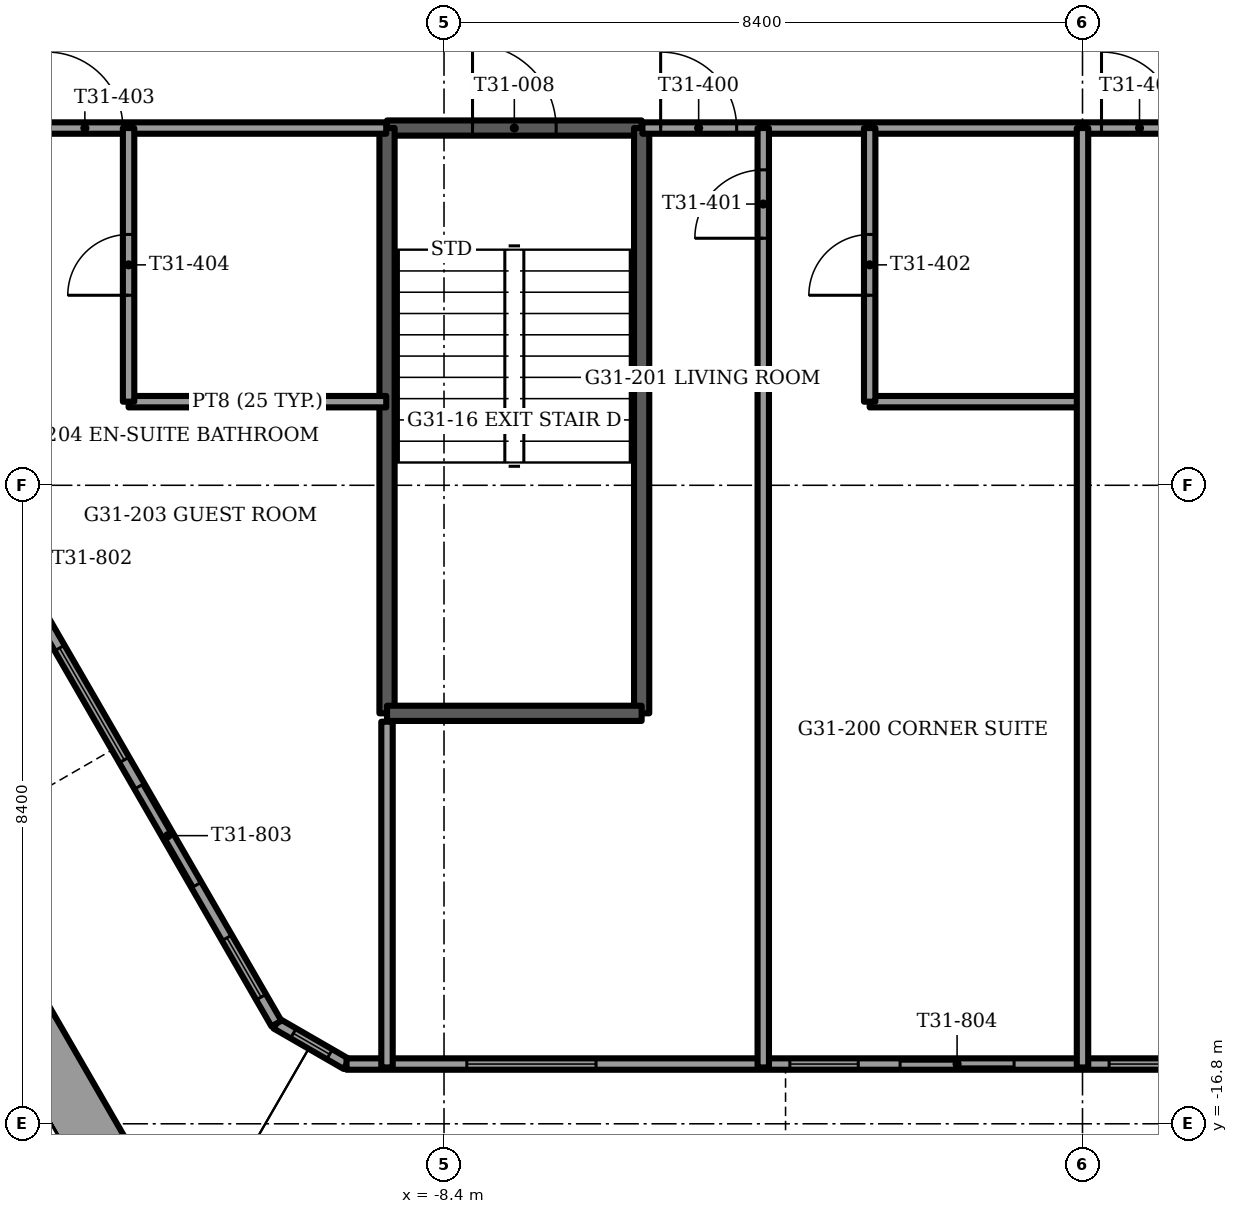
"""IFC4 building model, lengths in metres.
Left out: names, types, materials, properties, quantities, classifications, styles, units other than length and angle.
Written with IfcOpenShell. Run it as: python <this file> out.ifc"""

import sys

from ifc_helpers import new_model, si_unit, direction, frame, frame_2d, origin, place, context, subcontext, project, spatial, rectangle, extrude, element, fill, save


model = new_model("IFC4")
c1 = context("Model", 3, precision=1e-05, world=origin(), true_north=direction((0.0, 1.0)))
c2 = subcontext(c1, "Body", "Model", "MODEL_VIEW")
j1 = project(units=[si_unit("LENGTHUNIT", "METRE"), si_unit("PLANEANGLEUNIT", "RADIAN")], contexts=[c1])
p1 = place(None, origin())
s1 = spatial("IfcSite", under=j1, at=p1, CompositionType="ELEMENT")
p2 = place(p1, origin())
s2 = spatial("IfcBuilding", under=s1, at=p2, CompositionType="ELEMENT")
p3 = place(p2, frame((0.0, 0.0, 127.25)))
s3 = spatial("IfcBuildingStorey", under=s2, at=p3, CompositionType="ELEMENT", Elevation=127.25)
p4 = place(p3, frame((-14.952, -13.802, 0.0), z_axis=(0.0, 0.0, 1.0), x_axis=(0.499982573574, -0.866035464703, 0.0)))
e1 = element("IfcWall", 1, at=p4, inside=s3, PredefinedType="PARAPET", context=c2, shape_type="SweptSolid", body=[
    extrude(rectangle(XDim=5.281, YDim=0.9, at=frame_2d((2.641, 0.0))), origin(), (0.0, 0.0, 1.0), 1.1),
])
p5 = place(p3, frame((-18.71, -1.444, 0.0), z_axis=(0.0, 0.0, 1.0), x_axis=(0.500010582961, -0.866019293623, 0.0)))
e2 = element("IfcWall", 2, at=p5, inside=s3, PredefinedType="SOLIDWALL", context=c2, shape_type="SweptSolid", body=[
    extrude(rectangle(XDim=16.21, YDim=0.15, at=frame_2d((8.105, 0.0))), origin(), (0.0, 0.0, 1.0), 3.45),
])
p6 = place(p5, frame((2.93, 0.0, 0.15)))
e3 = element("IfcOpeningElement", 3, at=p6, cuts=e2, PredefinedType="OPENING", context=c2, shape_type="SweptSolid", body=[
    extrude(rectangle(XDim=0.9, YDim=2.85, at=frame_2d((0.45, 1.425))), frame((0.0, 0.075, 0.0), z_axis=(0.0, -1.0, 0.0), x_axis=(1.0, 0.0, 0.0)), (0.0, 0.0, 1.0), 0.15),
])
p7 = place(p5, frame((4.205, 0.0, 0.0)))
e4 = element("IfcOpeningElement", 4, at=p7, cuts=e2, PredefinedType="OPENING", context=c2, shape_type="SweptSolid", body=[
    extrude(rectangle(XDim=1.5, YDim=2.4, at=frame_2d((0.75, 1.2))), frame((0.0, 0.075, 0.0), z_axis=(0.0, -1.0, 0.0), x_axis=(1.0, 0.0, 0.0)), (0.0, 0.0, 1.0), 0.15),
])
p8 = place(p5, frame((6.305, 0.0, 0.15)))
e5 = element("IfcOpeningElement", 5, at=p8, cuts=e2, PredefinedType="OPENING", context=c2, shape_type="SweptSolid", body=[
    extrude(rectangle(XDim=1.7, YDim=2.85, at=frame_2d((0.85, 1.425))), frame((0.0, 0.075, 0.0), z_axis=(0.0, -1.0, 0.0), x_axis=(1.0, 0.0, 0.0)), (0.0, 0.0, 1.0), 0.15),
])
p9 = place(p5, frame((8.405, 0.0, 0.0)))
e6 = element("IfcOpeningElement", 6, at=p9, cuts=e2, PredefinedType="OPENING", context=c2, shape_type="SweptSolid", body=[
    extrude(rectangle(XDim=1.5, YDim=2.4, at=frame_2d((0.75, 1.2))), frame((0.0, 0.075, 0.0), z_axis=(0.0, -1.0, 0.0), x_axis=(1.0, 0.0, 0.0)), (0.0, 0.0, 1.0), 0.15),
])
p10 = place(p5, frame((10.505, 0.0, 0.15)))
e7 = element("IfcOpeningElement", 7, at=p10, cuts=e2, PredefinedType="OPENING", context=c2, shape_type="SweptSolid", body=[
    extrude(rectangle(XDim=1.7, YDim=2.85, at=frame_2d((0.85, 1.425))), frame((0.0, 0.075, 0.0), z_axis=(0.0, -1.0, 0.0), x_axis=(1.0, 0.0, 0.0)), (0.0, 0.0, 1.0), 0.15),
])
p11 = place(p5, frame((12.605, 0.0, 0.0)))
e8 = element("IfcOpeningElement", 8, at=p11, cuts=e2, PredefinedType="OPENING", context=c2, shape_type="SweptSolid", body=[
    extrude(rectangle(XDim=1.5, YDim=2.4, at=frame_2d((0.75, 1.2))), frame((0.0, 0.075, 0.0), z_axis=(0.0, -1.0, 0.0), x_axis=(1.0, 0.0, 0.0)), (0.0, 0.0, 1.0), 0.15),
])
p12 = place(p5, frame((0.402, 0.0, 0.15)))
e9 = element("IfcOpeningElement", 9, at=p12, cuts=e2, PredefinedType="OPENING", context=c2, shape_type="SweptSolid", body=[
    extrude(rectangle(XDim=0.9, YDim=2.73, at=frame_2d((0.45, 1.365))), frame((0.0, 0.075, 0.0), z_axis=(0.0, -1.0, 0.0), x_axis=(1.0, 0.0, 0.0)), (0.0, 0.0, 1.0), 0.15),
])
p13 = place(p5, frame((14.907, 0.0, 0.15)))
e10 = element("IfcOpeningElement", 10, at=p13, cuts=e2, PredefinedType="OPENING", context=c2, shape_type="SweptSolid", body=[
    extrude(rectangle(XDim=0.9, YDim=2.73, at=frame_2d((0.45, 1.365))), frame((0.0, 0.075, 0.0), z_axis=(0.0, -1.0, 0.0), x_axis=(1.0, 0.0, 0.0)), (0.0, 0.0, 1.0), 0.15),
])
p14 = place(p3, frame((-9.683, -16.014, 0.0), z_axis=(0.0, 0.0, 1.0), x_axis=(1.0, 0.0, 0.0)))
e11 = element("IfcWall", 11, at=p14, inside=s3, PredefinedType="SOLIDWALL", context=c2, shape_type="SweptSolid", body=[
    extrude(rectangle(XDim=19.365, YDim=0.15, at=frame_2d((9.683, 0.0))), origin(), (0.0, 0.0, 1.0), 3.45),
])
p15 = place(p14, frame((1.583, 0.0, 0.15)))
e12 = element("IfcOpeningElement", 12, at=p15, cuts=e11, PredefinedType="OPENING", context=c2, shape_type="SweptSolid", body=[
    extrude(rectangle(XDim=1.7, YDim=2.85, at=frame_2d((0.85, 1.425))), frame((0.0, 0.075, 0.0), z_axis=(0.0, -1.0, 0.0), x_axis=(1.0, 0.0, 0.0)), (0.0, 0.0, 1.0), 0.15),
])
p16 = place(p14, frame((5.833, 0.0, 0.15)))
e13 = element("IfcOpeningElement", 13, at=p16, cuts=e11, PredefinedType="OPENING", context=c2, shape_type="SweptSolid", body=[
    extrude(rectangle(XDim=0.9, YDim=2.85, at=frame_2d((0.45, 1.425))), frame((0.0, 0.075, 0.0), z_axis=(0.0, -1.0, 0.0), x_axis=(1.0, 0.0, 0.0)), (0.0, 0.0, 1.0), 0.15),
])
p17 = place(p14, frame((7.283, 0.0, 0.0)))
e14 = element("IfcOpeningElement", 14, at=p17, cuts=e11, PredefinedType="OPENING", context=c2, shape_type="SweptSolid", body=[
    extrude(rectangle(XDim=1.5, YDim=2.4, at=frame_2d((0.75, 1.2))), frame((0.0, 0.075, 0.0), z_axis=(0.0, -1.0, 0.0), x_axis=(1.0, 0.0, 0.0)), (0.0, 0.0, 1.0), 0.15),
])
p18 = place(p14, frame((10.033, 0.0, 0.15)))
e15 = element("IfcOpeningElement", 15, at=p18, cuts=e11, PredefinedType="OPENING", context=c2, shape_type="SweptSolid", body=[
    extrude(rectangle(XDim=1.7, YDim=2.85, at=frame_2d((0.85, 1.425))), frame((0.0, 0.075, 0.0), z_axis=(0.0, -1.0, 0.0), x_axis=(1.0, 0.0, 0.0)), (0.0, 0.0, 1.0), 0.15),
])
p19 = place(p14, frame((12.083, 0.0, 0.0)))
e16 = element("IfcOpeningElement", 16, at=p19, cuts=e11, PredefinedType="OPENING", context=c2, shape_type="SweptSolid", body=[
    extrude(rectangle(XDim=1.5, YDim=2.4, at=frame_2d((0.75, 1.2))), frame((0.0, 0.075, 0.0), z_axis=(0.0, -1.0, 0.0), x_axis=(1.0, 0.0, 0.0)), (0.0, 0.0, 1.0), 0.15),
])
p20 = place(p14, frame((15.833, 0.0, 0.15)))
e17 = element("IfcOpeningElement", 17, at=p20, cuts=e11, PredefinedType="OPENING", context=c2, shape_type="SweptSolid", body=[
    extrude(rectangle(XDim=1.7, YDim=2.85, at=frame_2d((0.85, 1.425))), frame((0.0, 0.075, 0.0), z_axis=(0.0, -1.0, 0.0), x_axis=(1.0, 0.0, 0.0)), (0.0, 0.0, 1.0), 0.15),
])
p21 = place(p3, frame((-10.605, -15.481, 0.0), z_axis=(0.0, 0.0, 1.0), x_axis=(0.866048165231, -0.499960573946, 0.0)))
e18 = element("IfcWall", 18, at=p21, inside=s3, PredefinedType="SOLIDWALL", context=c2, shape_type="SweptSolid", body=[
    extrude(rectangle(XDim=1.065, YDim=0.15, at=frame_2d((0.532, 0.0))), origin(), (0.0, 0.0, 1.0), 3.45),
])
p22 = place(p21, frame((0.258, 0.0, 0.15)))
e19 = element("IfcOpeningElement", 19, at=p22, cuts=e18, PredefinedType="OPENING", context=c2, shape_type="SweptSolid", body=[
    extrude(rectangle(XDim=0.55, YDim=2.85, at=frame_2d((0.275, 1.425))), frame((0.0, 0.075, 0.0), z_axis=(0.0, -1.0, 0.0), x_axis=(1.0, 0.0, 0.0)), (0.0, 0.0, 1.0), 0.15),
])
p23 = place(p3, frame((-9.15, -3.7, -0.3), z_axis=(0.0, 0.0, 1.0), x_axis=(1.0, 0.0, 0.0)))
e20 = element("IfcWall", 20, at=p23, inside=s3, PredefinedType="SOLIDWALL", context=c2, shape_type="SweptSolid", body=[
    extrude(rectangle(XDim=3.35, YDim=0.2, at=frame_2d((1.675, 0.0))), origin(), (0.0, 0.0, 1.0), 3.75),
])
p24 = place(p23, frame((1.125, 0.0, 0.0)))
e21 = element("IfcOpeningElement", 21, at=p24, cuts=e20, PredefinedType="OPENING", context=c2, shape_type="SweptSolid", body=[
    extrude(rectangle(XDim=1.1, YDim=2.1, at=frame_2d((0.55, 1.05))), frame((0.0, 0.1, 0.0), z_axis=(0.0, -1.0, 0.0), x_axis=(1.0, 0.0, 0.0)), (0.0, 0.0, 1.0), 0.2),
])
for number, where, z_axis, x_axis in (
    (22, (-9.15, -3.7, -0.3), (0.0, 0.0, 1.0), (0.0, -1.0, 0.0)),
    (23, (-5.8, -3.7, -0.3), (0.0, 0.0, 1.0), (0.0, -1.0, 0.0)),
):
    element("IfcWall", number, at=place(p3, frame(where, z_axis=z_axis, x_axis=x_axis)), inside=s3, PredefinedType="SOLIDWALL", context=c2, shape_type="SweptSolid", body=[
        extrude(rectangle(XDim=7.7, YDim=0.2, at=frame_2d((3.85, 0.0))), origin(), (0.0, 0.0, 1.0), 3.75),
    ])
p25 = place(p3, frame((-9.15, -11.4, -0.3), z_axis=(0.0, 0.0, 1.0), x_axis=(1.0, 0.0, 0.0)))
e24 = element("IfcWall", 24, at=p25, inside=s3, PredefinedType="SOLIDWALL", context=c2, shape_type="SweptSolid", body=[
    extrude(rectangle(XDim=3.35, YDim=0.2, at=frame_2d((1.675, 0.0))), origin(), (0.0, 0.0, 1.0), 3.75),
])
p26 = place(p3, frame((-12.55, -7.3, 0.0), z_axis=(0.0, 0.0, 1.0), x_axis=(1.0, 0.0, 0.0)))
e25 = element("IfcWall", 25, at=p26, inside=s3, PredefinedType="PARTITIONING", context=c2, shape_type="SweptSolid", body=[
    extrude(rectangle(XDim=3.39, YDim=0.15, at=frame_2d((1.695, 0.0))), origin(), (0.0, 0.0, 1.0), 3.45),
])
p27 = place(p3, frame((-2.8, -7.3, 0.0), z_axis=(0.0, 0.0, 1.0), x_axis=(1.0, 0.0, 0.0)))
e26 = element("IfcWall", 26, at=p27, inside=s3, PredefinedType="PARTITIONING", context=c2, shape_type="SweptSolid", body=[
    extrude(rectangle(XDim=2.8, YDim=0.15, at=frame_2d((1.4, 0.0))), origin(), (0.0, 0.0, 1.0), 3.45),
])
p28 = place(p3, frame((-17.459, -3.7, 0.0), z_axis=(0.0, 0.0, 1.0), x_axis=(1.0, 0.0, 0.0)))
e27 = element("IfcWall", 27, at=p28, inside=s3, PredefinedType="PARTITIONING", context=c2, shape_type="SweptSolid", body=[
    extrude(rectangle(XDim=8.299, YDim=0.15, at=frame_2d((4.149, 0.0))), origin(), (0.0, 0.0, 1.0), 3.45),
])
p29 = place(p28, frame((3.834, 0.0, 0.0)))
e28 = element("IfcOpeningElement", 28, at=p29, cuts=e27, PredefinedType="OPENING", context=c2, shape_type="SweptSolid", body=[
    extrude(rectangle(XDim=1.0, YDim=2.1, at=frame_2d((0.5, 1.05))), frame((0.0, 0.075, 0.0), z_axis=(0.0, -1.0, 0.0), x_axis=(1.0, 0.0, 0.0)), (0.0, 0.0, 1.0), 0.15),
])
p30 = place(p3, frame((-5.79, -3.7, 0.0), z_axis=(0.0, 0.0, 1.0), x_axis=(1.0, 0.0, 0.0)))
e29 = element("IfcWall", 29, at=p30, inside=s3, PredefinedType="PARTITIONING", context=c2, shape_type="SweptSolid", body=[
    extrude(rectangle(XDim=11.58, YDim=0.15, at=frame_2d((5.79, 0.0))), origin(), (0.0, 0.0, 1.0), 3.45),
])
p31 = place(p30, frame((0.24, 0.0, 0.0)))
e30 = element("IfcOpeningElement", 30, at=p31, cuts=e29, PredefinedType="OPENING", context=c2, shape_type="SweptSolid", body=[
    extrude(rectangle(XDim=1.0, YDim=2.1, at=frame_2d((0.5, 1.05))), frame((0.0, 0.075, 0.0), z_axis=(0.0, -1.0, 0.0), x_axis=(1.0, 0.0, 0.0)), (0.0, 0.0, 1.0), 0.15),
])
p32 = place(p30, frame((6.04, 0.0, 0.0)))
e31 = element("IfcOpeningElement", 31, at=p32, cuts=e29, PredefinedType="OPENING", context=c2, shape_type="SweptSolid", body=[
    extrude(rectangle(XDim=1.0, YDim=2.1, at=frame_2d((0.5, 1.05))), frame((0.0, 0.075, 0.0), z_axis=(0.0, -1.0, 0.0), x_axis=(1.0, 0.0, 0.0)), (0.0, 0.0, 1.0), 0.15),
])
p33 = place(p3, frame((0.0, -16.059, 0.0), z_axis=(0.0, 0.0, 1.0), x_axis=(0.0, 1.0, 0.0)))
e32 = element("IfcWall", 32, at=p33, inside=s3, PredefinedType="PARTITIONING", context=c2, shape_type="SweptSolid", body=[
    extrude(rectangle(XDim=12.359, YDim=0.15, at=frame_2d((6.18, 0.0))), origin(), (0.0, 0.0, 1.0), 3.45),
])
p34 = place(p3, frame((-2.8, -7.3, 0.0), z_axis=(0.0, 0.0, 1.0), x_axis=(0.0, 1.0, 0.0)))
e33 = element("IfcWall", 33, at=p34, inside=s3, PredefinedType="PARTITIONING", context=c2, shape_type="SweptSolid", body=[
    extrude(rectangle(XDim=3.6, YDim=0.15, at=frame_2d((1.8, 0.0))), origin(), (0.0, 0.0, 1.0), 3.45),
])
p35 = place(p34, frame((1.4, 0.0, 0.0)))
e34 = element("IfcOpeningElement", 34, at=p35, cuts=e33, PredefinedType="OPENING", context=c2, shape_type="SweptSolid", body=[
    extrude(rectangle(XDim=0.8, YDim=2.1, at=frame_2d((0.4, 1.05))), frame((0.0, 0.075, 0.0), z_axis=(0.0, -1.0, 0.0), x_axis=(1.0, 0.0, 0.0)), (0.0, 0.0, 1.0), 0.15),
])
p36 = place(p3, frame((-4.2, -16.059, 0.0), z_axis=(0.0, 0.0, 1.0), x_axis=(0.0, 1.0, 0.0)))
e35 = element("IfcWall", 35, at=p36, inside=s3, PredefinedType="PARTITIONING", context=c2, shape_type="SweptSolid", body=[
    extrude(rectangle(XDim=12.359, YDim=0.15, at=frame_2d((6.18, 0.0))), origin(), (0.0, 0.0, 1.0), 3.45),
])
p37 = place(p36, frame((10.909, 0.0, 0.0)))
e36 = element("IfcOpeningElement", 36, at=p37, cuts=e35, PredefinedType="OPENING", context=c2, shape_type="SweptSolid", body=[
    extrude(rectangle(XDim=0.9, YDim=2.1, at=frame_2d((0.45, 1.05))), frame((0.0, 0.075, 0.0), z_axis=(0.0, -1.0, 0.0), x_axis=(1.0, 0.0, 0.0)), (0.0, 0.0, 1.0), 0.15),
])
p38 = place(p3, frame((-9.15, -16.059, 0.0), z_axis=(0.0, 0.0, 1.0), x_axis=(0.0, 1.0, 0.0)))
e37 = element("IfcWall", 37, at=p38, inside=s3, PredefinedType="PARTITIONING", context=c2, shape_type="SweptSolid", body=[
    extrude(rectangle(XDim=4.549, YDim=0.15, at=frame_2d((2.274, 0.0))), origin(), (0.0, 0.0, 1.0), 3.45),
])
p39 = place(p3, frame((-12.55, -7.3, 0.0), z_axis=(0.0, 0.0, 1.0), x_axis=(0.0, 1.0, 0.0)))
e38 = element("IfcWall", 38, at=p39, inside=s3, PredefinedType="PARTITIONING", context=c2, shape_type="SweptSolid", body=[
    extrude(rectangle(XDim=3.6, YDim=0.15, at=frame_2d((1.8, 0.0))), origin(), (0.0, 0.0, 1.0), 3.45),
])
p40 = place(p39, frame((1.4, 0.0, 0.0)))
e39 = element("IfcOpeningElement", 39, at=p40, cuts=e38, PredefinedType="OPENING", context=c2, shape_type="SweptSolid", body=[
    extrude(rectangle(XDim=0.8, YDim=2.1, at=frame_2d((0.4, 1.05))), frame((0.0, 0.075, 0.0), z_axis=(0.0, -1.0, 0.0), x_axis=(1.0, 0.0, 0.0)), (0.0, 0.0, 1.0), 0.15),
])
p41 = place(p10, origin())
e40 = element("IfcWindow", 40, at=p41, inside=s3, PartitioningType="SINGLE_PANEL", PredefinedType="WINDOW", context=c2, shape_type="SweptSolid", body=[
    extrude(rectangle(XDim=1.7, YDim=2.85, at=frame_2d((0.85, 1.425))), frame((0.0, 0.03, 0.0), z_axis=(0.0, -1.0, 0.0), x_axis=(1.0, 0.0, 0.0)), (0.0, 0.0, 1.0), 0.06),
])
fill(e7, e40)
p42 = place(p11, origin())
e41 = element("IfcDoor", 41, at=p42, inside=s3, OperationType="SLIDING_TO_LEFT", PredefinedType="DOOR", context=c2, shape_type="SweptSolid", body=[
    extrude(rectangle(XDim=1.5, YDim=2.4, at=frame_2d((0.75, 1.2))), frame((0.0, 0.025, 0.0), z_axis=(0.0, -1.0, 0.0), x_axis=(1.0, 0.0, 0.0)), (0.0, 0.0, 1.0), 0.05),
])
fill(e8, e41)
p43 = place(p13, origin())
e42 = element("IfcWindow", 42, at=p43, inside=s3, PartitioningType="SINGLE_PANEL", PredefinedType="WINDOW", context=c2, shape_type="SweptSolid", body=[
    extrude(rectangle(XDim=0.9, YDim=2.73, at=frame_2d((0.45, 1.365))), frame((0.0, 0.03, 0.0), z_axis=(0.0, -1.0, 0.0), x_axis=(1.0, 0.0, 0.0)), (0.0, 0.0, 1.0), 0.06),
])
fill(e10, e42)
p44 = place(p15, origin())
e43 = element("IfcWindow", 43, at=p44, inside=s3, PartitioningType="SINGLE_PANEL", PredefinedType="WINDOW", context=c2, shape_type="SweptSolid", body=[
    extrude(rectangle(XDim=1.7, YDim=2.85, at=frame_2d((0.85, 1.425))), frame((0.0, 0.03, 0.0), z_axis=(0.0, -1.0, 0.0), x_axis=(1.0, 0.0, 0.0)), (0.0, 0.0, 1.0), 0.06),
])
fill(e12, e43)
p45 = place(p16, origin())
e44 = element("IfcWindow", 44, at=p45, inside=s3, PartitioningType="SINGLE_PANEL", PredefinedType="WINDOW", context=c2, shape_type="SweptSolid", body=[
    extrude(rectangle(XDim=0.9, YDim=2.85, at=frame_2d((0.45, 1.425))), frame((0.0, 0.03, 0.0), z_axis=(0.0, -1.0, 0.0), x_axis=(1.0, 0.0, 0.0)), (0.0, 0.0, 1.0), 0.06),
])
fill(e13, e44)
p46 = place(p17, origin())
e45 = element("IfcDoor", 45, at=p46, inside=s3, OperationType="SLIDING_TO_RIGHT", PredefinedType="DOOR", context=c2, shape_type="SweptSolid", body=[
    extrude(rectangle(XDim=1.5, YDim=2.4, at=frame_2d((0.75, 1.2))), frame((0.0, 0.025, 0.0), z_axis=(0.0, -1.0, 0.0), x_axis=(1.0, 0.0, 0.0)), (0.0, 0.0, 1.0), 0.05),
])
fill(e14, e45)
p47 = place(p18, origin())
e46 = element("IfcWindow", 46, at=p47, inside=s3, PartitioningType="SINGLE_PANEL", PredefinedType="WINDOW", context=c2, shape_type="SweptSolid", body=[
    extrude(rectangle(XDim=1.7, YDim=2.85, at=frame_2d((0.85, 1.425))), frame((0.0, 0.03, 0.0), z_axis=(0.0, -1.0, 0.0), x_axis=(1.0, 0.0, 0.0)), (0.0, 0.0, 1.0), 0.06),
])
fill(e15, e46)
p48 = place(p22, origin())
e47 = element("IfcWindow", 47, at=p48, inside=s3, PartitioningType="SINGLE_PANEL", PredefinedType="WINDOW", context=c2, shape_type="SweptSolid", body=[
    extrude(rectangle(XDim=0.55, YDim=2.85, at=frame_2d((0.275, 1.425))), frame((0.0, 0.03, 0.0), z_axis=(0.0, -1.0, 0.0), x_axis=(1.0, 0.0, 0.0)), (0.0, 0.0, 1.0), 0.06),
])
fill(e19, e47)
p49 = place(p24, origin())
e48 = element("IfcDoor", 48, at=p49, inside=s3, OperationType="SINGLE_SWING_LEFT", PredefinedType="DOOR", context=c2, shape_type="SweptSolid", body=[
    extrude(rectangle(XDim=1.1, YDim=2.1, at=frame_2d((0.55, 1.05))), frame((0.0, 0.025, 0.0), z_axis=(0.0, -1.0, 0.0), x_axis=(1.0, 0.0, 0.0)), (0.0, 0.0, 1.0), 0.05),
])
fill(e21, e48)
p50 = place(p31, origin())
e49 = element("IfcDoor", 49, at=p50, inside=s3, OperationType="SINGLE_SWING_LEFT", PredefinedType="DOOR", context=c2, shape_type="SweptSolid", body=[
    extrude(rectangle(XDim=1.0, YDim=2.1, at=frame_2d((0.5, 1.05))), frame((0.0, 0.025, 0.0), z_axis=(0.0, -1.0, 0.0), x_axis=(1.0, 0.0, 0.0)), (0.0, 0.0, 1.0), 0.05),
])
fill(e30, e49)
p51 = place(p37, origin())
e50 = element("IfcDoor", 50, at=p51, inside=s3, OperationType="SINGLE_SWING_RIGHT", PredefinedType="DOOR", context=c2, shape_type="SweptSolid", body=[
    extrude(rectangle(XDim=0.9, YDim=2.1, at=frame_2d((0.45, 1.05))), frame((0.0, 0.025, 0.0), z_axis=(0.0, -1.0, 0.0), x_axis=(1.0, 0.0, 0.0)), (0.0, 0.0, 1.0), 0.05),
])
fill(e36, e50)
p52 = place(p35, origin())
e51 = element("IfcDoor", 51, at=p52, inside=s3, OperationType="SINGLE_SWING_RIGHT", PredefinedType="DOOR", context=c2, shape_type="SweptSolid", body=[
    extrude(rectangle(XDim=0.8, YDim=2.1, at=frame_2d((0.4, 1.05))), frame((0.0, 0.025, 0.0), z_axis=(0.0, -1.0, 0.0), x_axis=(1.0, 0.0, 0.0)), (0.0, 0.0, 1.0), 0.05),
])
fill(e34, e51)
p53 = place(p29, origin())
e52 = element("IfcDoor", 52, at=p53, inside=s3, OperationType="SINGLE_SWING_LEFT", PredefinedType="DOOR", context=c2, shape_type="SweptSolid", body=[
    extrude(rectangle(XDim=1.0, YDim=2.1, at=frame_2d((0.5, 1.05))), frame((0.0, 0.025, 0.0), z_axis=(0.0, -1.0, 0.0), x_axis=(1.0, 0.0, 0.0)), (0.0, 0.0, 1.0), 0.05),
])
fill(e28, e52)
p54 = place(p40, origin())
e53 = element("IfcDoor", 53, at=p54, inside=s3, OperationType="SINGLE_SWING_RIGHT", PredefinedType="DOOR", context=c2, shape_type="SweptSolid", body=[
    extrude(rectangle(XDim=0.8, YDim=2.1, at=frame_2d((0.4, 1.05))), frame((0.0, 0.025, 0.0), z_axis=(0.0, -1.0, 0.0), x_axis=(1.0, 0.0, 0.0)), (0.0, 0.0, 1.0), 0.05),
])
fill(e39, e53)
p55 = place(p32, origin())
e54 = element("IfcDoor", 54, at=p55, inside=s3, OperationType="SINGLE_SWING_LEFT", PredefinedType="DOOR", context=c2, shape_type="SweptSolid", body=[
    extrude(rectangle(XDim=1.0, YDim=2.1, at=frame_2d((0.5, 1.05))), frame((0.0, 0.025, 0.0), z_axis=(0.0, -1.0, 0.0), x_axis=(1.0, 0.0, 0.0)), (0.0, 0.0, 1.0), 0.05),
])
fill(e31, e54)
save(model, sys.argv[1])
